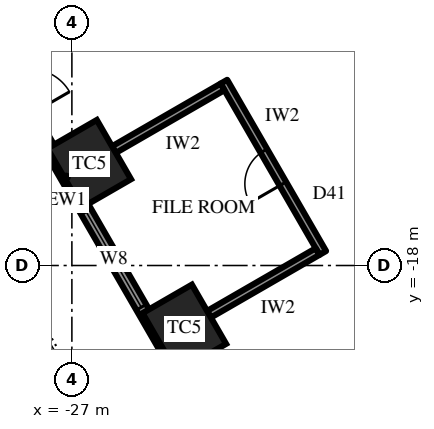
"""IFC4 building model, lengths in metres.
Left out: names, types, materials, properties, quantities, classifications, styles, units other than length and angle.
Written with IfcOpenShell. Run it as: python <this file> out.ifc"""

import sys

from ifc_helpers import new_model, si_unit, direction, frame, frame_2d, origin, origin_2d, place, context, subcontext, project, spatial, rectangle, extrude, element, fill, save


model = new_model("IFC4")
c1 = context("Model", 3, precision=1e-05, world=origin(), true_north=direction((0.0, 1.0)))
c2 = subcontext(c1, "Body", "Model", "MODEL_VIEW")
j1 = project(units=[si_unit("LENGTHUNIT", "METRE"), si_unit("PLANEANGLEUNIT", "RADIAN")], contexts=[c1])
p1 = place(None, origin())
s1 = spatial("IfcSite", under=j1, at=p1, CompositionType="ELEMENT")
p2 = place(p1, origin())
s2 = spatial("IfcBuilding", under=s1, at=p2, CompositionType="ELEMENT")
p3 = place(p2, frame((0.0, 0.0, 132.1)))
s3 = spatial("IfcBuildingStorey", under=s2, at=p3, CompositionType="ELEMENT", Elevation=132.1)
for number, where, z_axis, x_axis in (
    (1, (-26.544, -15.325, 0.0), (0.0, 0.0, 1.0), (0.5, -0.866, 0.0)),
    (2, (-24.042, -19.658, 0.0), (0.0, 0.0, 1.0), (0.5, -0.866, 0.0)),
):
    element("IfcColumn", number, at=place(p3, frame(where, z_axis=z_axis, x_axis=x_axis)), inside=s3, PredefinedType="COLUMN", context=c2, shape_type="SweptSolid", body=[
        extrude(rectangle(XDim=1.8, YDim=1.5, at=origin_2d()), origin(), (0.0, 0.0, 1.0), 4.2),
    ])
p4 = place(p3, frame((-34.656, -2.675, 0.0), z_axis=(0.0, 0.0, 1.0), x_axis=(0.500003084452, -0.866023622968, 0.0)))
e3 = element("IfcWall", 3, at=p4, inside=s3, PredefinedType="SOLIDWALL", context=c2, shape_type="SweptSolid", body=[
    extrude(rectangle(XDim=30.022, YDim=0.3, at=frame_2d((15.011, 0.0))), origin(), (0.0, 0.0, 1.0), 2.3),
])
p5 = place(p4, frame((1.052, 0.0, 0.6)))
e4 = element("IfcOpeningElement", 4, at=p5, cuts=e3, PredefinedType="OPENING", context=c2, shape_type="SweptSolid", body=[
    extrude(rectangle(XDim=2.9, YDim=1.45, at=frame_2d((1.45, 0.725))), frame((0.0, 0.16, 0.0), z_axis=(0.0, -1.0, 0.0), x_axis=(1.0, 0.0, 0.0)), (0.0, 0.0, 1.0), 0.32),
])
p6 = place(p4, frame((6.056, 0.0, 0.6)))
e5 = element("IfcOpeningElement", 5, at=p6, cuts=e3, PredefinedType="OPENING", context=c2, shape_type="SweptSolid", body=[
    extrude(rectangle(XDim=2.9, YDim=1.45, at=frame_2d((1.45, 0.725))), frame((0.0, 0.16, 0.0), z_axis=(0.0, -1.0, 0.0), x_axis=(1.0, 0.0, 0.0)), (0.0, 0.0, 1.0), 0.32),
])
p7 = place(p4, frame((11.909, 0.0, 0.0)))
e6 = element("IfcOpeningElement", 6, at=p7, cuts=e3, PredefinedType="OPENING", context=c2, shape_type="SweptSolid", body=[
    extrude(rectangle(XDim=1.2, YDim=2.2, at=frame_2d((0.6, 1.1))), frame((0.0, 0.16, 0.0), z_axis=(0.0, -1.0, 0.0), x_axis=(1.0, 0.0, 0.0)), (0.0, 0.0, 1.0), 0.32),
])
p8 = place(p4, frame((16.063, 0.0, 0.6)))
e7 = element("IfcOpeningElement", 7, at=p8, cuts=e3, PredefinedType="OPENING", context=c2, shape_type="SweptSolid", body=[
    extrude(rectangle(XDim=2.9, YDim=1.45, at=frame_2d((1.45, 0.725))), frame((0.0, 0.16, 0.0), z_axis=(0.0, -1.0, 0.0), x_axis=(1.0, 0.0, 0.0)), (0.0, 0.0, 1.0), 0.32),
])
p9 = place(p4, frame((21.067, 0.0, 0.6)))
e8 = element("IfcOpeningElement", 8, at=p9, cuts=e3, PredefinedType="OPENING", context=c2, shape_type="SweptSolid", body=[
    extrude(rectangle(XDim=2.9, YDim=1.45, at=frame_2d((1.45, 0.725))), frame((0.0, 0.16, 0.0), z_axis=(0.0, -1.0, 0.0), x_axis=(1.0, 0.0, 0.0)), (0.0, 0.0, 1.0), 0.32),
])
p10 = place(p4, frame((26.07, 0.0, 0.6)))
e9 = element("IfcOpeningElement", 9, at=p10, cuts=e3, PredefinedType="OPENING", context=c2, shape_type="SweptSolid", body=[
    extrude(rectangle(XDim=2.9, YDim=1.45, at=frame_2d((1.45, 0.725))), frame((0.0, 0.16, 0.0), z_axis=(0.0, -1.0, 0.0), x_axis=(1.0, 0.0, 0.0)), (0.0, 0.0, 1.0), 0.32),
])
p11 = place(p3, frame((-23.0, -13.163, 0.0), z_axis=(0.0, 0.0, 1.0), x_axis=(0.500024327116, -0.866011358062, 0.0)))
e10 = element("IfcWall", 10, at=p11, inside=s3, PredefinedType="PARTITIONING", context=c2, shape_type="SweptSolid", body=[
    extrude(rectangle(XDim=5.204, YDim=0.2, at=frame_2d((2.602, 0.0))), origin(), (0.0, 0.0, 1.0), 4.0),
])
p12 = place(p11, frame((2.102, 0.0, 0.0)))
e11 = element("IfcOpeningElement", 11, at=p12, cuts=e10, PredefinedType="OPENING", context=c2, shape_type="SweptSolid", body=[
    extrude(rectangle(XDim=1.0, YDim=2.2, at=frame_2d((0.5, 1.1))), frame((0.0, 0.11, 0.0), z_axis=(0.0, -1.0, 0.0), x_axis=(1.0, 0.0, 0.0)), (0.0, 0.0, 1.0), 0.22),
])
p13 = place(p3, frame((-23.036, -13.3, 0.0), z_axis=(0.0, 0.0, 1.0), x_axis=(-0.866021716278, -0.500006386895, 0.0)))
e12 = element("IfcWall", 12, at=p13, inside=s3, PredefinedType="PARTITIONING", context=c2, shape_type="SweptSolid", body=[
    extrude(rectangle(XDim=3.3, YDim=0.2, at=frame_2d((1.65, 0.0))), origin(), (0.0, 0.0, 1.0), 4.0),
])
p14 = place(p3, frame((-20.534, -17.633, 0.0), z_axis=(0.0, 0.0, 1.0), x_axis=(-0.866008176907, -0.50002983664, 0.0)))
e13 = element("IfcWall", 13, at=p14, inside=s3, PredefinedType="PARTITIONING", context=c2, shape_type="SweptSolid", body=[
    extrude(rectangle(XDim=3.3, YDim=0.2, at=frame_2d((1.65, 0.0))), origin(), (0.0, 0.0, 1.0), 3.082),
])
p15 = place(p8, origin())
e14 = element("IfcWindow", 14, at=p15, inside=s3, PartitioningType="SINGLE_PANEL", PredefinedType="WINDOW", context=c2, shape_type="SweptSolid", body=[
    extrude(rectangle(XDim=2.9, YDim=1.45, at=frame_2d((1.45, 0.725))), frame((0.0, 0.03, 0.0), z_axis=(0.0, -1.0, 0.0), x_axis=(1.0, 0.0, 0.0)), (0.0, 0.0, 1.0), 0.06),
])
fill(e7, e14)
p16 = place(p12, frame((1.0, 0.0, 0.0), z_axis=(0.0, 0.0, 1.0), x_axis=(-1.0, 0.0, 0.0)))
e15 = element("IfcDoor", 15, at=p16, inside=s3, OperationType="SINGLE_SWING_RIGHT", PredefinedType="DOOR", context=c2, shape_type="SweptSolid", body=[
    extrude(rectangle(XDim=1.0, YDim=2.2, at=frame_2d((0.5, 1.1))), frame((0.0, 0.025, 0.0), z_axis=(0.0, -1.0, 0.0), x_axis=(1.0, 0.0, 0.0)), (0.0, 0.0, 1.0), 0.05),
])
fill(e11, e15)
save(model, sys.argv[1])
